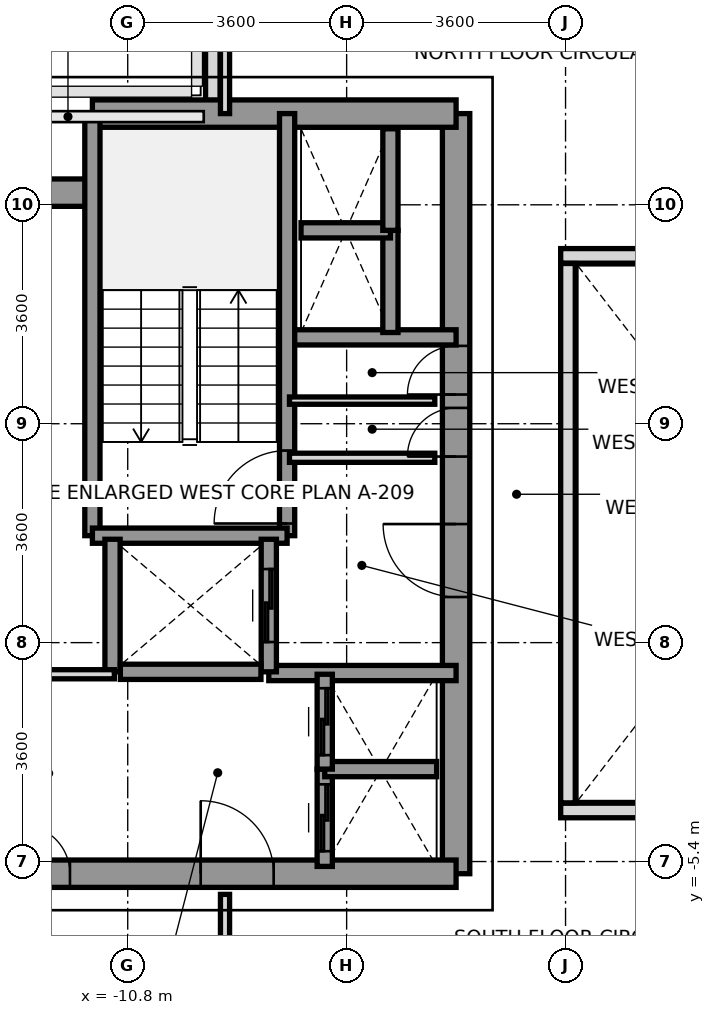
"""IFC4 building model, lengths in metres.
Left out: names, types, materials, properties, quantities, classifications, styles, units other than length and angle.
Written with IfcOpenShell. Run it as: python <this file> out.ifc"""

import sys

from ifc_helpers import new_model, si_unit, direction, frame, frame_2d, origin, place, context, subcontext, project, spatial, rectangle, extrude, source, transform, mapped, element, fill, save


model = new_model("IFC4")
c1 = context("Model", 3, precision=1e-05, world=origin(), true_north=direction((0.0, 1.0)))
c2 = subcontext(c1, "Body", "Model", "MODEL_VIEW")
j1 = project(units=[si_unit("LENGTHUNIT", "METRE"), si_unit("PLANEANGLEUNIT", "RADIAN")], contexts=[c1])
p1 = place(None, origin())
s1 = spatial("IfcSite", under=j1, at=p1, CompositionType="ELEMENT")
p2 = place(p1, origin())
s2 = spatial("IfcBuilding", under=s1, at=p2, CompositionType="ELEMENT")
p3 = place(p2, frame((0.0, 0.0, 110.8)))
s3 = spatial("IfcBuildingStorey", under=s2, at=p3, CompositionType="ELEMENT", Elevation=110.8)
p4 = place(p3, frame((-9.4, 6.953, 0.0), z_axis=(0.0, 0.0, 1.0), x_axis=(0.0, 1.0, 0.0)))
e1 = element("IfcWall", 1, at=p4, inside=s3, PredefinedType="PARAPET", context=c2, shape_type="SweptSolid", body=[
    extrude(rectangle(XDim=1.519, YDim=0.24, at=frame_2d((0.76, 0.0))), origin(), (0.0, 0.0, 1.0), 1.15),
])
p5 = place(p3, frame((-5.4, -5.6, 0.0), z_axis=(0.0, 0.0, 1.0), x_axis=(0.0, 1.0, 0.0)))
e2 = element("IfcWall", 2, at=p5, inside=s3, PredefinedType="SHEAR", context=c2, shape_type="SweptSolid", body=[
    extrude(rectangle(XDim=12.5, YDim=0.45, at=frame_2d((6.25, 0.0))), origin(), (0.0, 0.0, 1.0), 3.2),
])
p6 = place(p5, frame((4.55, 0.0, 0.0)))
e3 = element("IfcOpeningElement", 3, at=p6, cuts=e2, PredefinedType="OPENING", context=c2, shape_type="SweptSolid", body=[
    extrude(rectangle(XDim=1.2, YDim=2.2, at=frame_2d((0.6, 1.1))), frame((0.0, 0.235, 0.0), z_axis=(0.0, -1.0, 0.0), x_axis=(1.0, 0.0, 0.0)), (0.0, 0.0, 1.0), 0.47),
])
p7 = place(p5, frame((6.86, 0.0, 0.0)))
e4 = element("IfcOpeningElement", 4, at=p7, cuts=e2, PredefinedType="OPENING", context=c2, shape_type="SweptSolid", body=[
    extrude(rectangle(XDim=0.8, YDim=2.1, at=frame_2d((0.4, 1.05))), frame((0.0, 0.235, 0.0), z_axis=(0.0, -1.0, 0.0), x_axis=(1.0, 0.0, 0.0)), (0.0, 0.0, 1.0), 0.47),
])
p8 = place(p5, frame((7.88, 0.0, 0.0)))
e5 = element("IfcOpeningElement", 5, at=p8, cuts=e2, PredefinedType="OPENING", context=c2, shape_type="SweptSolid", body=[
    extrude(rectangle(XDim=0.8, YDim=2.1, at=frame_2d((0.4, 1.05))), frame((0.0, 0.235, 0.0), z_axis=(0.0, -1.0, 0.0), x_axis=(1.0, 0.0, 0.0)), (0.0, 0.0, 1.0), 0.47),
])
p9 = place(p3, frame((-11.381, 6.9, 0.0), z_axis=(0.0, 0.0, 1.0), x_axis=(1.0, 0.0, 0.0)))
e6 = element("IfcWall", 6, at=p9, inside=s3, PredefinedType="SHEAR", context=c2, shape_type="SweptSolid", body=[
    extrude(rectangle(XDim=5.981, YDim=0.45, at=frame_2d((2.991, 0.0))), origin(), (0.0, 0.0, 1.0), 3.2),
])
p10 = place(p3, frame((-13.2, 5.6, 0.0), z_axis=(0.0, 0.0, 1.0), x_axis=(1.0, 0.0, 0.0)))
e7 = element("IfcWall", 7, at=p10, inside=s3, PredefinedType="SHEAR", context=c2, shape_type="SweptSolid", body=[
    extrude(rectangle(XDim=1.819, YDim=0.45, at=frame_2d((0.909, 0.0))), origin(), (0.0, 0.0, 1.0), 3.2),
])
p11 = place(p3, frame((-13.2, -5.6, 0.0), z_axis=(0.0, 0.0, 1.0), x_axis=(1.0, 0.0, 0.0)))
e8 = element("IfcWall", 8, at=p11, inside=s3, PredefinedType="SHEAR", context=c2, shape_type="SweptSolid", body=[
    extrude(rectangle(XDim=7.8, YDim=0.45, at=frame_2d((3.9, 0.0))), origin(), (0.0, 0.0, 1.0), 3.2),
])
p12 = place(p11, frame((3.6, 0.0, 0.0)))
e9 = element("IfcOpeningElement", 9, at=p12, cuts=e8, PredefinedType="OPENING", context=c2, shape_type="SweptSolid", body=[
    extrude(rectangle(XDim=1.2, YDim=2.2, at=frame_2d((0.6, 1.1))), frame((0.0, 0.235, 0.0), z_axis=(0.0, -1.0, 0.0), x_axis=(1.0, 0.0, 0.0)), (0.0, 0.0, 1.0), 0.47),
])
p13 = place(p11, frame((0.65, 0.0, 0.0)))
e10 = element("IfcOpeningElement", 10, at=p13, cuts=e8, PredefinedType="OPENING", context=c2, shape_type="SweptSolid", body=[
    extrude(rectangle(XDim=0.8, YDim=2.1, at=frame_2d((0.4, 1.05))), frame((0.0, 0.235, 0.0), z_axis=(0.0, -1.0, 0.0), x_axis=(1.0, 0.0, 0.0)), (0.0, 0.0, 1.0), 0.47),
])
p14 = place(p3, frame((-8.18, 3.22, 0.0), z_axis=(0.0, 0.0, 1.0), x_axis=(1.0, 0.0, 0.0)))
e11 = element("IfcWall", 11, at=p14, inside=s3, PredefinedType="SOLIDWALL", context=c2, shape_type="SweptSolid", body=[
    extrude(rectangle(XDim=2.78, YDim=0.25, at=frame_2d((1.39, 0.0))), origin(), (0.0, 0.0, 1.0), 3.2),
])
p15 = place(p3, frame((-8.48, -2.3, 0.0), z_axis=(0.0, 0.0, 1.0), x_axis=(1.0, 0.0, 0.0)))
e12 = element("IfcWall", 12, at=p15, inside=s3, PredefinedType="SOLIDWALL", context=c2, shape_type="SweptSolid", body=[
    extrude(rectangle(XDim=3.08, YDim=0.25, at=frame_2d((1.54, 0.0))), origin(), (0.0, 0.0, 1.0), 3.2),
])
p16 = place(p3, frame((-8.179, -0.041, 0.0), z_axis=(0.0, 0.0, 1.0), x_axis=(0.0, 1.0, 0.0)))
e13 = element("IfcWall", 13, at=p16, inside=s3, PredefinedType="SOLIDWALL", context=c2, shape_type="SweptSolid", body=[
    extrude(rectangle(XDim=6.941, YDim=0.25, at=frame_2d((3.47, 0.0))), origin(), (0.0, 0.0, 1.0), 3.2),
])
p17 = place(p16, frame((0.2, 0.0, 0.0)))
e14 = element("IfcOpeningElement", 14, at=p17, cuts=e13, PredefinedType="OPENING", context=c2, shape_type="SweptSolid", body=[
    extrude(rectangle(XDim=1.2, YDim=2.2, at=frame_2d((0.6, 1.1))), frame((0.0, 0.135, 0.0), z_axis=(0.0, -1.0, 0.0), x_axis=(1.0, 0.0, 0.0)), (0.0, 0.0, 1.0), 0.27),
])
p18 = place(p3, frame((-11.381, -0.041, 0.0), z_axis=(0.0, 0.0, 1.0), x_axis=(0.0, 1.0, 0.0)))
e15 = element("IfcWall", 15, at=p18, inside=s3, PredefinedType="SOLIDWALL", context=c2, shape_type="SweptSolid", body=[
    extrude(rectangle(XDim=6.941, YDim=0.25, at=frame_2d((3.47, 0.0))), origin(), (0.0, 0.0, 1.0), 3.2),
])
p19 = place(p3, frame((-11.381, -0.041, 0.0), z_axis=(0.0, 0.0, 1.0), x_axis=(1.0, 0.0, 0.0)))
e16 = element("IfcWall", 16, at=p19, inside=s3, PredefinedType="SOLIDWALL", context=c2, shape_type="SweptSolid", body=[
    extrude(rectangle(XDim=3.202, YDim=0.25, at=frame_2d((1.601, 0.0))), origin(), (0.0, 0.0, 1.0), 3.2),
])
p20 = place(p3, frame((-11.05, -2.28, 0.0), z_axis=(0.0, 0.0, 1.0), x_axis=(0.0, 1.0, 0.0)))
e17 = element("IfcWall", 17, at=p20, inside=s3, PredefinedType="SOLIDWALL", context=c2, shape_type="SweptSolid", body=[
    extrude(rectangle(XDim=2.18, YDim=0.25, at=frame_2d((1.09, 0.0))), origin(), (0.0, 0.0, 1.0), 3.2),
])
p21 = place(p3, frame((-8.48, -2.28, 0.0), z_axis=(0.0, 0.0, 1.0), x_axis=(0.0, 1.0, 0.0)))
e18 = element("IfcWall", 18, at=p21, inside=s3, PredefinedType="SOLIDWALL", context=c2, shape_type="SweptSolid", body=[
    extrude(rectangle(XDim=2.18, YDim=0.25, at=frame_2d((1.09, 0.0))), origin(), (0.0, 0.0, 1.0), 3.2),
])
p22 = place(p21, frame((0.49, 0.0, 0.0)))
e19 = element("IfcOpeningElement", 19, at=p22, cuts=e18, PredefinedType="OPENING", context=c2, shape_type="SweptSolid", body=[
    extrude(rectangle(XDim=1.2, YDim=2.2, at=frame_2d((0.6, 1.1))), frame((0.0, 0.135, 0.0), z_axis=(0.0, -1.0, 0.0), x_axis=(1.0, 0.0, 0.0)), (0.0, 0.0, 1.0), 0.27),
])
p23 = place(p3, frame((-10.921, -2.28, 0.0), z_axis=(0.0, 0.0, 1.0), x_axis=(1.0, 0.0, 0.0)))
e20 = element("IfcWall", 20, at=p23, inside=s3, PredefinedType="SOLIDWALL", context=c2, shape_type="SweptSolid", body=[
    extrude(rectangle(XDim=2.312, YDim=0.25, at=frame_2d((1.156, 0.0))), origin(), (0.0, 0.0, 1.0), 3.2),
])
p24 = place(p3, frame((-7.56, -5.48, 0.0), z_axis=(0.0, 0.0, 1.0), x_axis=(0.0, 1.0, 0.0)))
e21 = element("IfcWall", 21, at=p24, inside=s3, PredefinedType="SOLIDWALL", context=c2, shape_type="SweptSolid", body=[
    extrude(rectangle(XDim=1.6, YDim=0.25, at=frame_2d((0.8, 0.0))), origin(), (0.0, 0.0, 1.0), 3.2),
])
p25 = place(p24, frame((0.25, 0.0, 0.0)))
e22 = element("IfcOpeningElement", 22, at=p25, cuts=e21, PredefinedType="OPENING", context=c2, shape_type="SweptSolid", body=[
    extrude(rectangle(XDim=1.1, YDim=2.2, at=frame_2d((0.55, 1.1))), frame((0.0, 0.135, 0.0), z_axis=(0.0, -1.0, 0.0), x_axis=(1.0, 0.0, 0.0)), (0.0, 0.0, 1.0), 0.27),
])
p26 = place(p3, frame((-7.56, -3.88, 0.0), z_axis=(0.0, 0.0, 1.0), x_axis=(1.0, 0.0, 0.0)))
e23 = element("IfcWall", 23, at=p26, inside=s3, PredefinedType="SOLIDWALL", context=c2, shape_type="SweptSolid", body=[
    extrude(rectangle(XDim=1.84, YDim=0.25, at=frame_2d((0.92, 0.0))), origin(), (0.0, 0.0, 1.0), 3.2),
])
p27 = place(p3, frame((-7.56, -3.88, 0.0), z_axis=(0.0, 0.0, 1.0), x_axis=(0.0, 1.0, 0.0)))
e24 = element("IfcWall", 24, at=p27, inside=s3, PredefinedType="SOLIDWALL", context=c2, shape_type="SweptSolid", body=[
    extrude(rectangle(XDim=1.56, YDim=0.25, at=frame_2d((0.78, 0.0))), origin(), (0.0, 0.0, 1.0), 3.2),
])
p28 = place(p27, frame((0.23, 0.0, 0.0)))
e25 = element("IfcOpeningElement", 25, at=p28, cuts=e24, PredefinedType="OPENING", context=c2, shape_type="SweptSolid", body=[
    extrude(rectangle(XDim=1.1, YDim=2.2, at=frame_2d((0.55, 1.1))), frame((0.0, 0.135, 0.0), z_axis=(0.0, -1.0, 0.0), x_axis=(1.0, 0.0, 0.0)), (0.0, 0.0, 1.0), 0.27),
])
p29 = place(p3, frame((-6.48, 3.3, 0.0), z_axis=(0.0, 0.0, 1.0), x_axis=(0.0, 1.0, 0.0)))
e26 = element("IfcWall", 26, at=p29, inside=s3, PredefinedType="SOLIDWALL", context=c2, shape_type="SweptSolid", body=[
    extrude(rectangle(XDim=1.68, YDim=0.25, at=frame_2d((0.84, 0.0))), origin(), (0.0, 0.0, 1.0), 3.2),
])
p30 = place(p3, frame((-7.95, 4.98, 0.0), z_axis=(0.0, 0.0, 1.0), x_axis=(1.0, 0.0, 0.0)))
e27 = element("IfcWall", 27, at=p30, inside=s3, PredefinedType="SOLIDWALL", context=c2, shape_type="SweptSolid", body=[
    extrude(rectangle(XDim=1.47, YDim=0.25, at=frame_2d((0.735, 0.0))), origin(), (0.0, 0.0, 1.0), 3.2),
])
p31 = place(p3, frame((-6.48, 4.98, 0.0), z_axis=(0.0, 0.0, 1.0), x_axis=(0.0, 1.0, 0.0)))
e28 = element("IfcWall", 28, at=p31, inside=s3, PredefinedType="SOLIDWALL", context=c2, shape_type="SweptSolid", body=[
    extrude(rectangle(XDim=1.67, YDim=0.25, at=frame_2d((0.835, 0.0))), origin(), (0.0, 0.0, 1.0), 3.2),
])
p32 = place(p3, frame((-8.14, 1.24, 0.0), z_axis=(0.0, 0.0, 1.0), x_axis=(1.0, 0.0, 0.0)))
e29 = element("IfcWall", 29, at=p32, inside=s3, PredefinedType="PARTITIONING", context=c2, shape_type="SweptSolid", body=[
    extrude(rectangle(XDim=2.39, YDim=0.15, at=frame_2d((1.195, 0.0))), origin(), (0.0, 0.0, 1.0), 2.3),
])
p33 = place(p3, frame((-8.14, 2.18, 0.0), z_axis=(0.0, 0.0, 1.0), x_axis=(1.0, 0.0, 0.0)))
e30 = element("IfcWall", 30, at=p33, inside=s3, PredefinedType="PARTITIONING", context=c2, shape_type="SweptSolid", body=[
    extrude(rectangle(XDim=2.39, YDim=0.12, at=frame_2d((1.195, 0.0))), origin(), (0.0, 0.0, 1.0), 2.3),
])
p34 = place(p3, frame((-13.2, -2.32, 0.0), z_axis=(0.0, 0.0, 1.0), x_axis=(1.0, 0.0, 0.0)))
e31 = element("IfcWall", 31, at=p34, inside=s3, PredefinedType="PARTITIONING", context=c2, shape_type="SweptSolid", body=[
    extrude(rectangle(XDim=2.18, YDim=0.15, at=frame_2d((1.09, 0.0))), origin(), (0.0, 0.0, 1.0), 3.2),
])
p35 = place(p3, frame((-9.2, 6.9, 0.0), z_axis=(0.0, 0.0, 1.0), x_axis=(0.0, 1.0, 0.0)))
e32 = element("IfcWall", 32, at=p35, inside=s3, PredefinedType="PARTITIONING", context=c2, shape_type="SweptSolid", body=[
    extrude(rectangle(XDim=8.78, YDim=0.15, at=frame_2d((4.39, 0.0))), origin(), (0.0, 0.0, 1.0), 2.7),
])
p36 = place(p3, frame((-9.2, -15.68, 0.0), z_axis=(0.0, 0.0, 1.0), x_axis=(0.0, 1.0, 0.0)))
e33 = element("IfcWall", 33, at=p36, inside=s3, PredefinedType="PARTITIONING", context=c2, shape_type="SweptSolid", body=[
    extrude(rectangle(XDim=9.74, YDim=0.15, at=frame_2d((4.87, 0.0))), origin(), (0.0, 0.0, 1.0), 2.7),
])
for number, where, z_axis, x_axis in (
    (34, (-3.68, -4.56, 0.0), (0.0, 0.0, 1.0), (1.0, 0.0, 0.0)),
    (35, (-3.68, 4.56, 0.0), (0.0, 0.0, 1.0), (1.0, 0.0, 0.0)),
):
    element("IfcWall", number, at=place(p3, frame(where, z_axis=z_axis, x_axis=x_axis)), inside=s3, PredefinedType="PARAPET", context=c2, shape_type="SweptSolid", body=[
        extrude(rectangle(XDim=7.36, YDim=0.24, at=frame_2d((3.68, 0.0))), origin(), (0.0, 0.0, 1.0), 1.15),
    ])
p37 = place(p3, frame((-3.56, -4.435, 0.0), z_axis=(0.0, 0.0, 1.0), x_axis=(0.0, 1.0, 0.0)))
e36 = element("IfcWall", 36, at=p37, inside=s3, PredefinedType="PARAPET", context=c2, shape_type="SweptSolid", body=[
    extrude(rectangle(XDim=8.87, YDim=0.24, at=frame_2d((4.435, 0.0))), origin(), (0.0, 0.0, 1.0), 1.15),
])
m1 = source(origin(), c2, "Body", "SweptSolid", [
    extrude(rectangle(XDim=1.2, YDim=2.2, at=frame_2d((0.6, 1.1))), frame((0.0, 0.025, 0.0), z_axis=(0.0, -1.0, 0.0), x_axis=(1.0, 0.0, 0.0)), (0.0, 0.0, 1.0), 0.05),
])
p38 = place(p17, origin())
e37 = element("IfcDoor", 37, at=p38, inside=s3, OperationType="SINGLE_SWING_LEFT", PredefinedType="DOOR", context=c2, shape_type="MappedRepresentation", body=[
    mapped(m1, transform((0.0, 0.0, 0.0), x_axis=(1.0, 0.0, 0.0), y_axis=(0.0, 1.0, 0.0), z_axis=(0.0, 0.0, 1.0), scale=1.0)),
])
fill(e14, e37)
p39 = place(p6, origin())
e38 = element("IfcDoor", 38, at=p39, inside=s3, OperationType="SINGLE_SWING_RIGHT", PredefinedType="DOOR", context=c2, shape_type="MappedRepresentation", body=[
    mapped(m1, transform((0.0, 0.0, 0.0), x_axis=(1.0, 0.0, 0.0), y_axis=(0.0, 1.0, 0.0), z_axis=(0.0, 0.0, 1.0), scale=1.0)),
])
fill(e3, e38)
p40 = place(p12, origin())
e39 = element("IfcDoor", 39, at=p40, inside=s3, OperationType="SINGLE_SWING_LEFT", PredefinedType="DOOR", context=c2, shape_type="MappedRepresentation", body=[
    mapped(m1, transform((0.0, 0.0, 0.0), x_axis=(1.0, 0.0, 0.0), y_axis=(0.0, 1.0, 0.0), z_axis=(0.0, 0.0, 1.0), scale=1.0)),
])
fill(e9, e39)
m2 = source(origin(), c2, "Body", "SweptSolid", [
    extrude(rectangle(XDim=0.8, YDim=2.1, at=frame_2d((0.4, 1.05))), frame((0.0, 0.025, 0.0), z_axis=(0.0, -1.0, 0.0), x_axis=(1.0, 0.0, 0.0)), (0.0, 0.0, 1.0), 0.05),
])
p41 = place(p7, origin())
e40 = element("IfcDoor", 40, at=p41, inside=s3, OperationType="SINGLE_SWING_LEFT", PredefinedType="DOOR", context=c2, shape_type="MappedRepresentation", body=[
    mapped(m2, transform((0.0, 0.0, 0.0), x_axis=(1.0, 0.0, 0.0), y_axis=(0.0, 1.0, 0.0), z_axis=(0.0, 0.0, 1.0), scale=1.0)),
])
fill(e4, e40)
p42 = place(p8, origin())
e41 = element("IfcDoor", 41, at=p42, inside=s3, OperationType="SINGLE_SWING_LEFT", PredefinedType="DOOR", context=c2, shape_type="MappedRepresentation", body=[
    mapped(m2, transform((0.0, 0.0, 0.0), x_axis=(1.0, 0.0, 0.0), y_axis=(0.0, 1.0, 0.0), z_axis=(0.0, 0.0, 1.0), scale=1.0)),
])
fill(e5, e41)
p43 = place(p13, origin())
e42 = element("IfcDoor", 42, at=p43, inside=s3, OperationType="SINGLE_SWING_LEFT", PredefinedType="DOOR", context=c2, shape_type="MappedRepresentation", body=[
    mapped(m2, transform((0.0, 0.0, 0.0), x_axis=(1.0, 0.0, 0.0), y_axis=(0.0, 1.0, 0.0), z_axis=(0.0, 0.0, 1.0), scale=1.0)),
])
fill(e10, e42)
p44 = place(p22, origin())
e43 = element("IfcDoor", 43, at=p44, inside=s3, OperationType="SLIDING_TO_RIGHT", PredefinedType="DOOR", context=c2, shape_type="MappedRepresentation", body=[
    mapped(m1, transform((0.0, 0.0, 0.0), x_axis=(1.0, 0.0, 0.0), y_axis=(0.0, 1.0, 0.0), z_axis=(0.0, 0.0, 1.0), scale=1.0)),
])
fill(e19, e43)
m3 = source(origin(), c2, "Body", "SweptSolid", [
    extrude(rectangle(XDim=1.1, YDim=2.2, at=frame_2d((0.55, 1.1))), frame((0.0, 0.025, 0.0), z_axis=(0.0, -1.0, 0.0), x_axis=(1.0, 0.0, 0.0)), (0.0, 0.0, 1.0), 0.05),
])
p45 = place(p25, origin())
e44 = element("IfcDoor", 44, at=p45, inside=s3, OperationType="SLIDING_TO_LEFT", PredefinedType="DOOR", context=c2, shape_type="MappedRepresentation", body=[
    mapped(m3, transform((0.0, 0.0, 0.0), x_axis=(1.0, 0.0, 0.0), y_axis=(0.0, 1.0, 0.0), z_axis=(0.0, 0.0, 1.0), scale=1.0)),
])
fill(e22, e44)
p46 = place(p28, origin())
e45 = element("IfcDoor", 45, at=p46, inside=s3, OperationType="SLIDING_TO_LEFT", PredefinedType="DOOR", context=c2, shape_type="MappedRepresentation", body=[
    mapped(m3, transform((0.0, 0.0, 0.0), x_axis=(1.0, 0.0, 0.0), y_axis=(0.0, 1.0, 0.0), z_axis=(0.0, 0.0, 1.0), scale=1.0)),
])
fill(e25, e45)
save(model, sys.argv[1])
